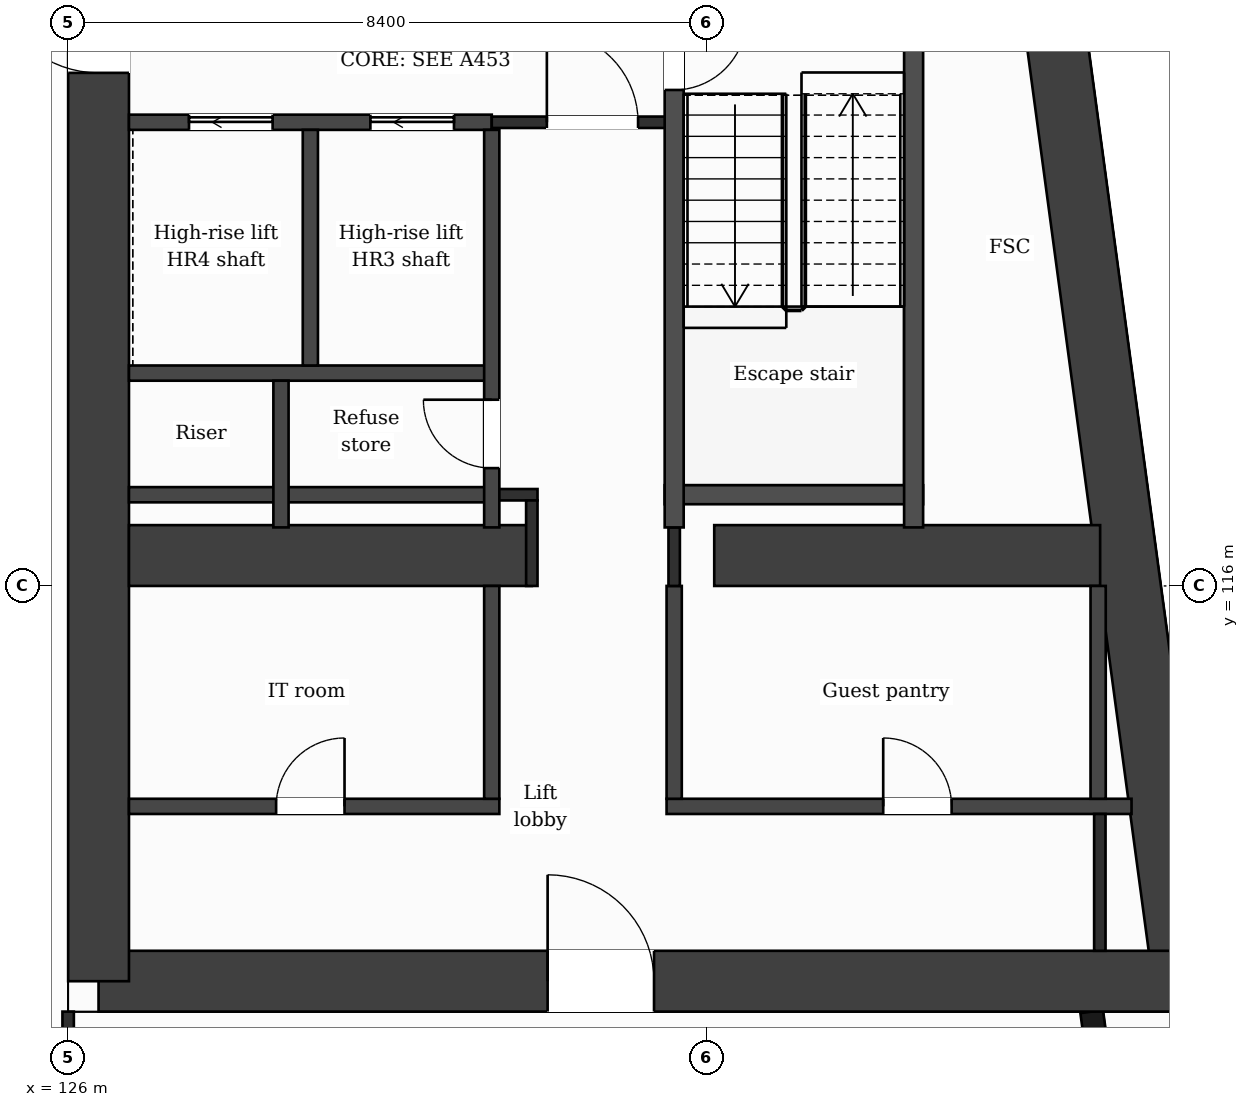
"""IFC4 building model, lengths in metres.
Left out: names, types, materials, properties, quantities, classifications, styles, units other than length and angle.
Written with IfcOpenShell. Run it as: python <this file> out.ifc"""

import sys

from ifc_helpers import new_model, si_unit, direction, frame, frame_2d, origin, place, context, subcontext, project, spatial, rectangle, extrude, element, fill, save


model = new_model("IFC4")
c1 = context("Model", 3, precision=1e-05, world=origin(), true_north=direction((0.0, 1.0)))
c2 = subcontext(c1, "Body", "Model", "MODEL_VIEW")
j1 = project(units=[si_unit("LENGTHUNIT", "METRE"), si_unit("PLANEANGLEUNIT", "RADIAN")], contexts=[c1])
p1 = place(None, origin())
s1 = spatial("IfcSite", under=j1, at=p1, CompositionType="ELEMENT")
p2 = place(p1, origin())
s2 = spatial("IfcBuilding", under=s1, at=p2, CompositionType="ELEMENT")
p3 = place(p2, frame((0.0, 0.0, 217.0)))
s3 = spatial("IfcBuildingStorey", under=s2, at=p3, CompositionType="ELEMENT", Elevation=217.0)
p4 = place(p3, frame((137.82, 132.0, 0.0), z_axis=(0.0, 0.0, 1.0), x_axis=(0.133408347329, -0.991061154956, 0.0)))
e1 = element("IfcWall", 1, at=p4, inside=s3, PredefinedType="SHEAR", context=c2, shape_type="SweptSolid", body=[
    extrude(rectangle(XDim=21.391, YDim=0.8, at=frame_2d((10.696, 0.0))), origin(), (0.0, 0.0, 1.0), 3.7),
])
p5 = place(p3, frame((140.673, 110.8, 0.0), z_axis=(0.0, 0.0, 1.0), x_axis=(-1.0, 0.0, 0.0)))
e2 = element("IfcWall", 2, at=p5, inside=s3, PredefinedType="SHEAR", context=c2, shape_type="SweptSolid", body=[
    extrude(rectangle(XDim=14.273, YDim=0.8, at=frame_2d((7.137, 0.0))), origin(), (0.0, 0.0, 1.0), 3.7),
])
p6 = place(p5, frame((6.965, 0.0, 0.0)))
e3 = element("IfcOpeningElement", 3, at=p6, cuts=e2, PredefinedType="OPENING", context=c2, shape_type="SweptSolid", body=[
    extrude(rectangle(XDim=1.4, YDim=2.1, at=frame_2d((0.7, 1.05))), frame((0.0, 0.41, 0.0), z_axis=(0.0, -1.0, 0.0), x_axis=(1.0, 0.0, 0.0)), (0.0, 0.0, 1.0), 0.82),
])
p7 = place(p3, frame((126.4, 110.8, 0.0), z_axis=(0.0, 0.0, 1.0), x_axis=(0.0, 1.0, 0.0)))
e4 = element("IfcWall", 4, at=p7, inside=s3, PredefinedType="SHEAR", context=c2, shape_type="SweptSolid", body=[
    extrude(rectangle(XDim=21.2, YDim=0.8, at=frame_2d((10.6, 0.0))), origin(), (0.0, 0.0, 1.0), 3.7),
])
p8 = place(p7, frame((11.95, 0.0, 0.0)))
e5 = element("IfcOpeningElement", 5, at=p8, cuts=e4, PredefinedType="OPENING", context=c2, shape_type="SweptSolid", body=[
    extrude(rectangle(XDim=1.4, YDim=2.1, at=frame_2d((0.7, 1.05))), frame((0.0, 0.41, 0.0), z_axis=(0.0, -1.0, 0.0), x_axis=(1.0, 0.0, 0.0)), (0.0, 0.0, 1.0), 0.82),
])
p9 = place(p3, frame((126.8, 116.4, 0.0), z_axis=(0.0, 0.0, 1.0), x_axis=(1.0, 0.0, 0.0)))
e6 = element("IfcWall", 6, at=p9, inside=s3, PredefinedType="SHEAR", context=c2, shape_type="SweptSolid", body=[
    extrude(rectangle(XDim=5.3, YDim=0.8, at=frame_2d((2.65, 0.0))), origin(), (0.0, 0.0, 1.0), 3.7),
])
p10 = place(p3, frame((134.5, 116.4, 0.0), z_axis=(0.0, 0.0, 1.0), x_axis=(1.0, 0.0, 0.0)))
e7 = element("IfcWall", 7, at=p10, inside=s3, PredefinedType="SHEAR", context=c2, shape_type="SweptSolid", body=[
    extrude(rectangle(XDim=5.077, YDim=0.8, at=frame_2d((2.539, 0.0))), origin(), (0.0, 0.0, 1.0), 3.7),
])
p11 = place(p3, frame((140.348, 103.85, 0.0), z_axis=(0.0, 0.0, 1.0), x_axis=(-0.133431549479, 0.991058031401, 0.0)))
e8 = element("IfcWall", 8, at=p11, inside=s3, PredefinedType="SOLIDWALL", context=c2, shape_type="SweptSolid", body=[
    extrude(rectangle(XDim=6.609, YDim=0.3, at=frame_2d((3.304, 0.0))), origin(), (0.0, 0.0, 1.0), 3.38),
])
p12 = place(p11, frame((0.737, 0.0, 0.9)))
e9 = element("IfcOpeningElement", 9, at=p12, cuts=e8, PredefinedType="OPENING", context=c2, shape_type="SweptSolid", body=[
    extrude(rectangle(XDim=1.2, YDim=2.1, at=frame_2d((0.6, 1.05))), frame((0.0, 0.16, 0.0), z_axis=(0.0, -1.0, 0.0), x_axis=(1.0, 0.0, 0.0)), (0.0, 0.0, 1.0), 0.32),
])
p13 = place(p11, frame((3.991, 0.0, 0.0)))
e10 = element("IfcOpeningElement", 10, at=p13, cuts=e8, PredefinedType="OPENING", context=c2, shape_type="SweptSolid", body=[
    extrude(rectangle(XDim=1.2, YDim=2.4, at=frame_2d((0.6, 1.2))), frame((0.0, 0.16, 0.0), z_axis=(0.0, -1.0, 0.0), x_axis=(1.0, 0.0, 0.0)), (0.0, 0.0, 1.0), 0.32),
])
p14 = place(p3, frame((126.8, 113.1, 0.0), z_axis=(0.0, 0.0, 1.0), x_axis=(1.0, 0.0, 0.0)))
e11 = element("IfcWall", 11, at=p14, inside=s3, PredefinedType="PARTITIONING", context=c2, shape_type="SweptSolid", body=[
    extrude(rectangle(XDim=4.873, YDim=0.2, at=frame_2d((2.437, 0.0))), origin(), (0.0, 0.0, 1.0), 3.38),
])
p15 = place(p14, frame((1.936, 0.0, 0.0)))
e12 = element("IfcOpeningElement", 12, at=p15, cuts=e11, PredefinedType="OPENING", context=c2, shape_type="SweptSolid", body=[
    extrude(rectangle(XDim=0.9, YDim=2.1, at=frame_2d((0.45, 1.05))), frame((0.0, 0.11, 0.0), z_axis=(0.0, -1.0, 0.0), x_axis=(1.0, 0.0, 0.0)), (0.0, 0.0, 1.0), 0.22),
])
p16 = place(p3, frame((133.873, 113.1, 0.0), z_axis=(0.0, 0.0, 1.0), x_axis=(1.0, 0.0, 0.0)))
e13 = element("IfcWall", 13, at=p16, inside=s3, PredefinedType="PARTITIONING", context=c2, shape_type="SweptSolid", body=[
    extrude(rectangle(XDim=6.117, YDim=0.2, at=frame_2d((3.059, 0.0))), origin(), (0.0, 0.0, 1.0), 3.38),
])
p17 = place(p16, frame((2.85, 0.0, 0.0)))
e14 = element("IfcOpeningElement", 14, at=p17, cuts=e13, PredefinedType="OPENING", context=c2, shape_type="SweptSolid", body=[
    extrude(rectangle(XDim=0.9, YDim=2.1, at=frame_2d((0.45, 1.05))), frame((0.0, 0.11, 0.0), z_axis=(0.0, -1.0, 0.0), x_axis=(1.0, 0.0, 0.0)), (0.0, 0.0, 1.0), 0.22),
])
p18 = place(p3, frame((126.8, 117.2, 0.0), z_axis=(0.0, 0.0, 1.0), x_axis=(1.0, 0.0, 0.0)))
e15 = element("IfcWall", 15, at=p18, inside=s3, PredefinedType="PARTITIONING", context=c2, shape_type="SweptSolid", body=[
    extrude(rectangle(XDim=4.773, YDim=0.2, at=frame_2d((2.386, 0.0))), origin(), (0.0, 0.0, 1.0), 3.38),
])
p19 = place(p3, frame((131.573, 117.2, 0.0), z_axis=(0.0, 0.0, 1.0), x_axis=(1.0, 0.0, 0.0)))
e16 = element("IfcWall", 16, at=p19, inside=s3, PredefinedType="PARTITIONING", context=c2, shape_type="SweptSolid", body=[
    extrude(rectangle(XDim=0.602, YDim=0.15, at=frame_2d((0.301, 0.0))), origin(), (0.0, 0.0, 1.0), 3.38),
])
p20 = place(p3, frame((133.848, 117.2, 0.0), z_axis=(0.0, 0.0, 1.0), x_axis=(1.0, 0.0, 0.0)))
e17 = element("IfcWall", 17, at=p20, inside=s3, PredefinedType="PARTITIONING", context=c2, shape_type="SweptSolid", body=[
    extrude(rectangle(XDim=3.4, YDim=0.25, at=frame_2d((1.7, 0.0))), origin(), (0.0, 0.0, 1.0), 3.38),
])
p21 = place(p3, frame((126.8, 118.8, 0.0), z_axis=(0.0, 0.0, 1.0), x_axis=(1.0, 0.0, 0.0)))
e18 = element("IfcWall", 18, at=p21, inside=s3, PredefinedType="PARTITIONING", context=c2, shape_type="SweptSolid", body=[
    extrude(rectangle(XDim=4.773, YDim=0.2, at=frame_2d((2.386, 0.0))), origin(), (0.0, 0.0, 1.0), 3.38),
])
p22 = place(p3, frame((126.8, 122.1, 0.0), z_axis=(0.0, 0.0, 1.0), x_axis=(1.0, 0.0, 0.0)))
e19 = element("IfcWall", 19, at=p22, inside=s3, PredefinedType="PARTITIONING", context=c2, shape_type="SweptSolid", body=[
    extrude(rectangle(XDim=4.773, YDim=0.2, at=frame_2d((2.386, 0.0))), origin(), (0.0, 0.0, 1.0), 3.38),
])
p23 = place(p22, frame((3.176, 0.0, 0.0)))
e20 = element("IfcOpeningElement", 20, at=p23, cuts=e19, PredefinedType="OPENING", context=c2, shape_type="SweptSolid", body=[
    extrude(rectangle(XDim=1.1, YDim=2.1, at=frame_2d((0.55, 1.05))), frame((0.0, 0.11, 0.0), z_axis=(0.0, -1.0, 0.0), x_axis=(1.0, 0.0, 0.0)), (0.0, 0.0, 1.0), 0.22),
])
p24 = place(p22, frame((0.79, 0.0, 0.0)))
e21 = element("IfcOpeningElement", 21, at=p24, cuts=e19, PredefinedType="OPENING", context=c2, shape_type="SweptSolid", body=[
    extrude(rectangle(XDim=1.1, YDim=2.1, at=frame_2d((0.55, 1.05))), frame((0.0, 0.11, 0.0), z_axis=(0.0, -1.0, 0.0), x_axis=(1.0, 0.0, 0.0)), (0.0, 0.0, 1.0), 0.22),
])
p25 = place(p3, frame((131.573, 122.1, 0.0), z_axis=(0.0, 0.0, 1.0), x_axis=(1.0, 0.0, 0.0)))
e22 = element("IfcWall", 22, at=p25, inside=s3, PredefinedType="PARTITIONING", context=c2, shape_type="SweptSolid", body=[
    extrude(rectangle(XDim=2.4, YDim=0.15, at=frame_2d((1.2, 0.0))), origin(), (0.0, 0.0, 1.0), 3.38),
])
p26 = place(p25, frame((0.725, 0.0, 0.0)))
e23 = element("IfcOpeningElement", 23, at=p26, cuts=e22, PredefinedType="OPENING", context=c2, shape_type="SweptSolid", body=[
    extrude(rectangle(XDim=1.2, YDim=2.1, at=frame_2d((0.6, 1.05))), frame((0.0, 0.085, 0.0), z_axis=(0.0, -1.0, 0.0), x_axis=(1.0, 0.0, 0.0)), (0.0, 0.0, 1.0), 0.17),
])
p27 = place(p3, frame((126.0, 109.075, 0.0), z_axis=(0.0, 0.0, 1.0), x_axis=(0.0, 1.0, 0.0)))
e24 = element("IfcWall", 24, at=p27, inside=s3, PredefinedType="PARTITIONING", context=c2, shape_type="SweptSolid", body=[
    extrude(rectangle(XDim=1.325, YDim=0.15, at=frame_2d((0.663, 0.0))), origin(), (0.0, 0.0, 1.0), 3.38),
])
p28 = place(p3, frame((128.8, 116.77, 0.0), z_axis=(0.0, 0.0, 1.0), x_axis=(0.0, 1.0, 0.0)))
e25 = element("IfcWall", 25, at=p28, inside=s3, PredefinedType="PARTITIONING", context=c2, shape_type="SweptSolid", body=[
    extrude(rectangle(XDim=1.93, YDim=0.2, at=frame_2d((0.965, 0.0))), origin(), (0.0, 0.0, 1.0), 3.38),
])
p29 = place(p3, frame((129.187, 118.9, 0.0), z_axis=(0.0, 0.0, 1.0), x_axis=(0.0, 1.0, 0.0)))
e26 = element("IfcWall", 26, at=p29, inside=s3, PredefinedType="PARTITIONING", context=c2, shape_type="SweptSolid", body=[
    extrude(rectangle(XDim=3.1, YDim=0.2, at=frame_2d((1.55, 0.0))), origin(), (0.0, 0.0, 1.0), 3.38),
])
p30 = place(p3, frame((131.573, 113.2, 0.0), z_axis=(0.0, 0.0, 1.0), x_axis=(0.0, 1.0, 0.0)))
e27 = element("IfcWall", 27, at=p30, inside=s3, PredefinedType="PARTITIONING", context=c2, shape_type="SweptSolid", body=[
    extrude(rectangle(XDim=2.8, YDim=0.2, at=frame_2d((1.4, 0.0))), origin(), (0.0, 0.0, 1.0), 3.38),
])
p31 = place(p3, frame((131.573, 116.77, 0.0), z_axis=(0.0, 0.0, 1.0), x_axis=(0.0, 1.0, 0.0)))
e28 = element("IfcWall", 28, at=p31, inside=s3, PredefinedType="PARTITIONING", context=c2, shape_type="SweptSolid", body=[
    extrude(rectangle(XDim=5.23, YDim=0.2, at=frame_2d((2.615, 0.0))), origin(), (0.0, 0.0, 1.0), 3.38),
])
p32 = place(p31, frame((0.78, 0.0, 0.0)))
e29 = element("IfcOpeningElement", 29, at=p32, cuts=e28, PredefinedType="OPENING", context=c2, shape_type="SweptSolid", body=[
    extrude(rectangle(XDim=0.9, YDim=2.1, at=frame_2d((0.45, 1.05))), frame((0.0, 0.11, 0.0), z_axis=(0.0, -1.0, 0.0), x_axis=(1.0, 0.0, 0.0)), (0.0, 0.0, 1.0), 0.22),
])
p33 = place(p3, frame((132.1, 116.0, 0.0), z_axis=(0.0, 0.0, 1.0), x_axis=(0.0, 1.0, 0.0)))
e30 = element("IfcWall", 30, at=p33, inside=s3, PredefinedType="PARTITIONING", context=c2, shape_type="SweptSolid", body=[
    extrude(rectangle(XDim=1.125, YDim=0.15, at=frame_2d((0.562, 0.0))), origin(), (0.0, 0.0, 1.0), 3.38),
])
p34 = place(p3, frame((133.973, 113.2, 0.0), z_axis=(0.0, 0.0, 1.0), x_axis=(0.0, 1.0, 0.0)))
e31 = element("IfcWall", 31, at=p34, inside=s3, PredefinedType="PARTITIONING", context=c2, shape_type="SweptSolid", body=[
    extrude(rectangle(XDim=2.8, YDim=0.2, at=frame_2d((1.4, 0.0))), origin(), (0.0, 0.0, 1.0), 3.38),
])
p35 = place(p3, frame((133.973, 116.0, 0.0), z_axis=(0.0, 0.0, 1.0), x_axis=(0.0, 1.0, 0.0)))
e32 = element("IfcWall", 32, at=p35, inside=s3, PredefinedType="PARTITIONING", context=c2, shape_type="SweptSolid", body=[
    extrude(rectangle(XDim=0.77, YDim=0.15, at=frame_2d((0.385, 0.0))), origin(), (0.0, 0.0, 1.0), 3.38),
])
p36 = place(p3, frame((133.973, 116.77, 0.0), z_axis=(0.0, 0.0, 1.0), x_axis=(0.0, 1.0, 0.0)))
e33 = element("IfcWall", 33, at=p36, inside=s3, PredefinedType="PARTITIONING", context=c2, shape_type="SweptSolid", body=[
    extrude(rectangle(XDim=7.055, YDim=0.25, at=frame_2d((3.527, 0.0))), origin(), (0.0, 0.0, 1.0), 3.38),
])
p37 = place(p36, frame((5.755, 0.0, 0.0)))
e34 = element("IfcOpeningElement", 34, at=p37, cuts=e33, PredefinedType="OPENING", context=c2, shape_type="SweptSolid", body=[
    extrude(rectangle(XDim=0.95, YDim=2.1, at=frame_2d((0.475, 1.05))), frame((0.0, 0.135, 0.0), z_axis=(0.0, -1.0, 0.0), x_axis=(1.0, 0.0, 0.0)), (0.0, 0.0, 1.0), 0.27),
])
p38 = place(p3, frame((137.123, 116.77, 0.0), z_axis=(0.0, 0.0, 1.0), x_axis=(0.0, 1.0, 0.0)))
e35 = element("IfcWall", 35, at=p38, inside=s3, PredefinedType="PARTITIONING", context=c2, shape_type="SweptSolid", body=[
    extrude(rectangle(XDim=7.055, YDim=0.25, at=frame_2d((3.527, 0.0))), origin(), (0.0, 0.0, 1.0), 3.38),
])
p39 = place(p3, frame((139.551, 113.2, 0.0), z_axis=(0.0, 0.0, 1.0), x_axis=(0.0, 1.0, 0.0)))
e36 = element("IfcWall", 36, at=p39, inside=s3, PredefinedType="PARTITIONING", context=c2, shape_type="SweptSolid", body=[
    extrude(rectangle(XDim=2.8, YDim=0.2, at=frame_2d((1.4, 0.0))), origin(), (0.0, 0.0, 1.0), 3.38),
])
p40 = place(p3, frame((139.573, 111.2, 0.0), z_axis=(0.0, 0.0, 1.0), x_axis=(0.0, 1.0, 0.0)))
e37 = element("IfcWall", 37, at=p40, inside=s3, PredefinedType="PARTITIONING", context=c2, shape_type="SweptSolid", body=[
    extrude(rectangle(XDim=1.8, YDim=0.15, at=frame_2d((0.9, 0.0))), origin(), (0.0, 0.0, 1.0), 3.38),
])
p41 = place(p26, origin())
e38 = element("IfcDoor", 38, at=p41, inside=s3, OperationType="SINGLE_SWING_LEFT", PredefinedType="DOOR", context=c2, shape_type="SweptSolid", body=[
    extrude(rectangle(XDim=1.2, YDim=2.1, at=frame_2d((0.6, 1.05))), frame((0.0, 0.025, 0.0), z_axis=(0.0, -1.0, 0.0), x_axis=(1.0, 0.0, 0.0)), (0.0, 0.0, 1.0), 0.05),
])
fill(e23, e38)
p42 = place(p23, origin())
e39 = element("IfcDoor", 39, at=p42, inside=s3, OperationType="SLIDING_TO_LEFT", PredefinedType="DOOR", context=c2, shape_type="SweptSolid", body=[
    extrude(rectangle(XDim=1.1, YDim=2.1, at=frame_2d((0.55, 1.05))), frame((0.0, 0.025, 0.0), z_axis=(0.0, -1.0, 0.0), x_axis=(1.0, 0.0, 0.0)), (0.0, 0.0, 1.0), 0.05),
])
fill(e20, e39)
p43 = place(p24, origin())
e40 = element("IfcDoor", 40, at=p43, inside=s3, OperationType="SLIDING_TO_LEFT", PredefinedType="DOOR", context=c2, shape_type="SweptSolid", body=[
    extrude(rectangle(XDim=1.1, YDim=2.1, at=frame_2d((0.55, 1.05))), frame((0.0, 0.025, 0.0), z_axis=(0.0, -1.0, 0.0), x_axis=(1.0, 0.0, 0.0)), (0.0, 0.0, 1.0), 0.05),
])
fill(e21, e40)
p44 = place(p37, origin())
e41 = element("IfcDoor", 41, at=p44, inside=s3, OperationType="SINGLE_SWING_RIGHT", PredefinedType="DOOR", context=c2, shape_type="SweptSolid", body=[
    extrude(rectangle(XDim=0.95, YDim=2.1, at=frame_2d((0.475, 1.05))), frame((0.0, 0.025, 0.0), z_axis=(0.0, -1.0, 0.0), x_axis=(1.0, 0.0, 0.0)), (0.0, 0.0, 1.0), 0.05),
])
fill(e34, e41)
p45 = place(p32, origin())
e42 = element("IfcDoor", 42, at=p45, inside=s3, OperationType="SINGLE_SWING_RIGHT", PredefinedType="DOOR", context=c2, shape_type="SweptSolid", body=[
    extrude(rectangle(XDim=0.9, YDim=2.1, at=frame_2d((0.45, 1.05))), frame((0.0, 0.025, 0.0), z_axis=(0.0, -1.0, 0.0), x_axis=(1.0, 0.0, 0.0)), (0.0, 0.0, 1.0), 0.05),
])
fill(e29, e42)
p46 = place(p17, origin())
e43 = element("IfcDoor", 43, at=p46, inside=s3, OperationType="SINGLE_SWING_LEFT", PredefinedType="DOOR", context=c2, shape_type="SweptSolid", body=[
    extrude(rectangle(XDim=0.9, YDim=2.1, at=frame_2d((0.45, 1.05))), frame((0.0, 0.025, 0.0), z_axis=(0.0, -1.0, 0.0), x_axis=(1.0, 0.0, 0.0)), (0.0, 0.0, 1.0), 0.05),
])
fill(e14, e43)
p47 = place(p15, origin())
e44 = element("IfcDoor", 44, at=p47, inside=s3, OperationType="SINGLE_SWING_RIGHT", PredefinedType="DOOR", context=c2, shape_type="SweptSolid", body=[
    extrude(rectangle(XDim=0.9, YDim=2.1, at=frame_2d((0.45, 1.05))), frame((0.0, 0.025, 0.0), z_axis=(0.0, -1.0, 0.0), x_axis=(1.0, 0.0, 0.0)), (0.0, 0.0, 1.0), 0.05),
])
fill(e12, e44)
p48 = place(p6, origin())
e45 = element("IfcDoor", 45, at=p48, inside=s3, OperationType="SINGLE_SWING_RIGHT", PredefinedType="DOOR", context=c2, shape_type="SweptSolid", body=[
    extrude(rectangle(XDim=1.4, YDim=2.1, at=frame_2d((0.7, 1.05))), frame((0.0, 0.025, 0.0), z_axis=(0.0, -1.0, 0.0), x_axis=(1.0, 0.0, 0.0)), (0.0, 0.0, 1.0), 0.05),
])
fill(e3, e45)
p49 = place(p8, origin())
e46 = element("IfcDoor", 46, at=p49, inside=s3, OperationType="SINGLE_SWING_RIGHT", PredefinedType="DOOR", context=c2, shape_type="SweptSolid", body=[
    extrude(rectangle(XDim=1.4, YDim=2.1, at=frame_2d((0.7, 1.05))), frame((0.0, 0.025, 0.0), z_axis=(0.0, -1.0, 0.0), x_axis=(1.0, 0.0, 0.0)), (0.0, 0.0, 1.0), 0.05),
])
fill(e5, e46)
save(model, sys.argv[1])
